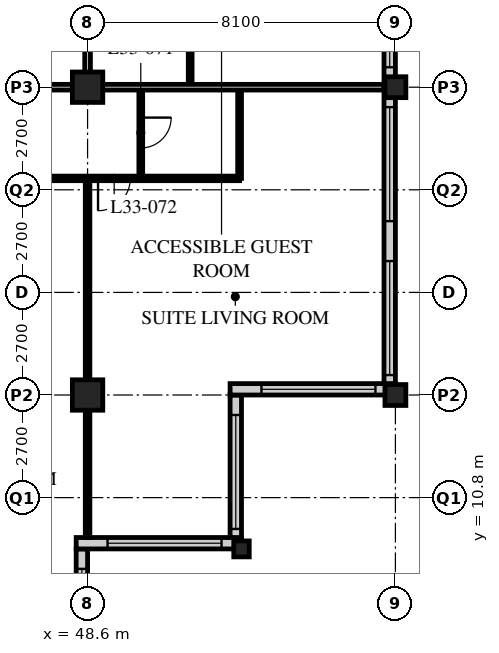
"""IFC4 building model, lengths in metres.
Left out: names, types, materials, properties, quantities, classifications, styles, units other than length and angle.
Written with IfcOpenShell. Run it as: python <this file> out.ifc"""

import sys

from ifc_helpers import new_model, si_unit, direction, frame, frame_2d, origin, origin_2d, place, context, subcontext, project, spatial, rectangle, hollow_rectangle, i_section, extrude, element, fill, save


model = new_model("IFC4")
c1 = context("Model", 3, precision=1e-05, world=origin(), true_north=direction((0.0, 1.0)))
c2 = subcontext(c1, "Body", "Model", "MODEL_VIEW")
j1 = project(units=[si_unit("LENGTHUNIT", "METRE"), si_unit("PLANEANGLEUNIT", "RADIAN")], contexts=[c1])
p1 = place(None, origin())
s1 = spatial("IfcSite", under=j1, at=p1, CompositionType="ELEMENT")
p2 = place(p1, origin())
s2 = spatial("IfcBuilding", under=s1, at=p2, CompositionType="ELEMENT")
p3 = place(p2, frame((0.0, 0.0, 130.6)))
s3 = spatial("IfcBuildingStorey", under=s2, at=p3, CompositionType="ELEMENT", Elevation=130.6)
for number, where, z_axis, x_axis in (
    (1, (48.6, 13.5, 0.0), (0.0, 0.0, 1.0), (1.0, 0.0, 0.0)),
    (2, (48.6, 21.6, 0.0), (0.0, 0.0, 1.0), (1.0, 0.0, 0.0)),
):
    element("IfcColumn", number, at=place(p3, frame(where, z_axis=z_axis, x_axis=x_axis)), inside=s3, PredefinedType="COLUMN", context=c2, shape_type="SweptSolid", body=[
        extrude(hollow_rectangle(XDim=0.8, YDim=0.8, WallThickness=0.08, at=origin_2d()), origin(), (0.0, 0.0, 1.0), 3.4),
    ])
p4 = place(p3, frame((52.65, 9.45, 0.0), z_axis=(0.0, 0.0, 1.0), x_axis=(1.0, 0.0, 0.0)))
e3 = element("IfcColumn", 3, at=p4, inside=s3, PredefinedType="COLUMN", context=c2, shape_type="SweptSolid", body=[
    extrude(i_section(OverallWidth=0.407, OverallDepth=0.419, WebThickness=0.031, FlangeThickness=0.049, FilletRadius=0.015, at=origin_2d()), origin(), (0.0, 0.0, 1.0), 3.4),
])
for number, where, z_axis, x_axis in (
    (4, (56.7, 13.5, 0.0), (0.0, 0.0, 1.0), (1.0, 0.0, 0.0)),
    (5, (56.7, 21.6, 0.0), (0.0, 0.0, 1.0), (1.0, 0.0, 0.0)),
):
    element("IfcColumn", number, at=place(p3, frame(where, z_axis=z_axis, x_axis=x_axis)), inside=s3, PredefinedType="COLUMN", context=c2, shape_type="SweptSolid", body=[
        extrude(hollow_rectangle(XDim=0.55, YDim=0.55, WallThickness=0.04, at=origin_2d()), origin(), (0.0, 0.0, 1.0), 3.4),
    ])
p5 = place(p3, frame((48.45, 5.7, 0.0), z_axis=(0.0, 0.0, 1.0), x_axis=(0.0, 1.0, 0.0)))
e6 = element("IfcWall", 6, at=p5, inside=s3, PredefinedType="SOLIDWALL", context=c2, shape_type="SweptSolid", body=[
    extrude(rectangle(XDim=3.75, YDim=0.3, at=frame_2d((1.875, 0.0))), origin(), (0.0, 0.0, 1.0), 3.19),
])
p6 = place(p5, frame((0.225, 0.0, 0.9)))
e7 = element("IfcOpeningElement", 7, at=p6, cuts=e6, PredefinedType="OPENING", context=c2, shape_type="SweptSolid", body=[
    extrude(rectangle(XDim=3.0, YDim=1.5, at=frame_2d((1.5, 0.75))), frame((0.0, 0.16, 0.0), z_axis=(0.0, -1.0, 0.0), x_axis=(1.0, 0.0, 0.0)), (0.0, 0.0, 1.0), 0.32),
])
p7 = place(p3, frame((48.3, 9.6, 0.0), z_axis=(0.0, 0.0, 1.0), x_axis=(1.0, 0.0, 0.0)))
e8 = element("IfcWall", 8, at=p7, inside=s3, PredefinedType="SOLIDWALL", context=c2, shape_type="SweptSolid", body=[
    extrude(rectangle(XDim=4.35, YDim=0.3, at=frame_2d((2.175, 0.0))), origin(), (0.0, 0.0, 1.0), 3.19),
])
p8 = place(p7, frame((0.825, 0.0, 0.9)))
e9 = element("IfcOpeningElement", 9, at=p8, cuts=e8, PredefinedType="OPENING", context=c2, shape_type="SweptSolid", body=[
    extrude(rectangle(XDim=3.0, YDim=1.5, at=frame_2d((1.5, 0.75))), frame((0.0, 0.16, 0.0), z_axis=(0.0, -1.0, 0.0), x_axis=(1.0, 0.0, 0.0)), (0.0, 0.0, 1.0), 0.32),
])
p9 = place(p3, frame((52.5, 9.75, 0.0), z_axis=(0.0, 0.0, 1.0), x_axis=(0.0, 1.0, 0.0)))
e10 = element("IfcWall", 10, at=p9, inside=s3, PredefinedType="SOLIDWALL", context=c2, shape_type="SweptSolid", body=[
    extrude(rectangle(XDim=3.75, YDim=0.3, at=frame_2d((1.875, 0.0))), origin(), (0.0, 0.0, 1.0), 3.19),
])
p10 = place(p9, frame((0.225, 0.0, 0.9)))
e11 = element("IfcOpeningElement", 11, at=p10, cuts=e10, PredefinedType="OPENING", context=c2, shape_type="SweptSolid", body=[
    extrude(rectangle(XDim=3.0, YDim=1.5, at=frame_2d((1.5, 0.75))), frame((0.0, 0.16, 0.0), z_axis=(0.0, -1.0, 0.0), x_axis=(1.0, 0.0, 0.0)), (0.0, 0.0, 1.0), 0.32),
])
p11 = place(p3, frame((52.35, 13.65, 0.0), z_axis=(0.0, 0.0, 1.0), x_axis=(1.0, 0.0, 0.0)))
e12 = element("IfcWall", 12, at=p11, inside=s3, PredefinedType="SOLIDWALL", context=c2, shape_type="SweptSolid", body=[
    extrude(rectangle(XDim=4.35, YDim=0.3, at=frame_2d((2.175, 0.0))), origin(), (0.0, 0.0, 1.0), 3.19),
])
p12 = place(p11, frame((0.825, 0.0, 0.9)))
e13 = element("IfcOpeningElement", 13, at=p12, cuts=e12, PredefinedType="OPENING", context=c2, shape_type="SweptSolid", body=[
    extrude(rectangle(XDim=3.0, YDim=1.5, at=frame_2d((1.5, 0.75))), frame((0.0, 0.16, 0.0), z_axis=(0.0, -1.0, 0.0), x_axis=(1.0, 0.0, 0.0)), (0.0, 0.0, 1.0), 0.32),
])
p13 = place(p3, frame((56.55, 13.8, 0.0), z_axis=(0.0, 0.0, 1.0), x_axis=(0.0, 1.0, 0.0)))
e14 = element("IfcWall", 14, at=p13, inside=s3, PredefinedType="SOLIDWALL", context=c2, shape_type="SweptSolid", body=[
    extrude(rectangle(XDim=32.1, YDim=0.3, at=frame_2d((16.05, 0.0))), origin(), (0.0, 0.0, 1.0), 3.19),
])
p14 = place(p13, frame((0.225, 0.0, 0.9)))
e15 = element("IfcOpeningElement", 15, at=p14, cuts=e14, PredefinedType="OPENING", context=c2, shape_type="SweptSolid", body=[
    extrude(rectangle(XDim=3.0, YDim=2.0, at=frame_2d((1.5, 1.0))), frame((0.0, 0.16, 0.0), z_axis=(0.0, -1.0, 0.0), x_axis=(1.0, 0.0, 0.0)), (0.0, 0.0, 1.0), 0.32),
])
p15 = place(p13, frame((4.275, 0.0, 0.9)))
e16 = element("IfcOpeningElement", 16, at=p15, cuts=e14, PredefinedType="OPENING", context=c2, shape_type="SweptSolid", body=[
    extrude(rectangle(XDim=3.0, YDim=2.0, at=frame_2d((1.5, 1.0))), frame((0.0, 0.16, 0.0), z_axis=(0.0, -1.0, 0.0), x_axis=(1.0, 0.0, 0.0)), (0.0, 0.0, 1.0), 0.32),
])
p16 = place(p13, frame((8.325, 0.0, 0.9)))
e17 = element("IfcOpeningElement", 17, at=p16, cuts=e14, PredefinedType="OPENING", context=c2, shape_type="SweptSolid", body=[
    extrude(rectangle(XDim=3.0, YDim=2.0, at=frame_2d((1.5, 1.0))), frame((0.0, 0.16, 0.0), z_axis=(0.0, -1.0, 0.0), x_axis=(1.0, 0.0, 0.0)), (0.0, 0.0, 1.0), 0.32),
])
p17 = place(p13, frame((12.375, 0.0, 0.9)))
e18 = element("IfcOpeningElement", 18, at=p17, cuts=e14, PredefinedType="OPENING", context=c2, shape_type="SweptSolid", body=[
    extrude(rectangle(XDim=3.0, YDim=2.0, at=frame_2d((1.5, 1.0))), frame((0.0, 0.16, 0.0), z_axis=(0.0, -1.0, 0.0), x_axis=(1.0, 0.0, 0.0)), (0.0, 0.0, 1.0), 0.32),
])
p18 = place(p13, frame((16.425, 0.0, 0.9)))
e19 = element("IfcOpeningElement", 19, at=p18, cuts=e14, PredefinedType="OPENING", context=c2, shape_type="SweptSolid", body=[
    extrude(rectangle(XDim=3.0, YDim=2.0, at=frame_2d((1.5, 1.0))), frame((0.0, 0.16, 0.0), z_axis=(0.0, -1.0, 0.0), x_axis=(1.0, 0.0, 0.0)), (0.0, 0.0, 1.0), 0.32),
])
p19 = place(p13, frame((20.475, 0.0, 0.9)))
e20 = element("IfcOpeningElement", 20, at=p19, cuts=e14, PredefinedType="OPENING", context=c2, shape_type="SweptSolid", body=[
    extrude(rectangle(XDim=3.0, YDim=2.0, at=frame_2d((1.5, 1.0))), frame((0.0, 0.16, 0.0), z_axis=(0.0, -1.0, 0.0), x_axis=(1.0, 0.0, 0.0)), (0.0, 0.0, 1.0), 0.32),
])
p20 = place(p13, frame((24.525, 0.0, 0.9)))
e21 = element("IfcOpeningElement", 21, at=p20, cuts=e14, PredefinedType="OPENING", context=c2, shape_type="SweptSolid", body=[
    extrude(rectangle(XDim=3.0, YDim=2.0, at=frame_2d((1.5, 1.0))), frame((0.0, 0.16, 0.0), z_axis=(0.0, -1.0, 0.0), x_axis=(1.0, 0.0, 0.0)), (0.0, 0.0, 1.0), 0.32),
])
p21 = place(p13, frame((28.575, 0.0, 0.9)))
e22 = element("IfcOpeningElement", 22, at=p21, cuts=e14, PredefinedType="OPENING", context=c2, shape_type="SweptSolid", body=[
    extrude(rectangle(XDim=3.0, YDim=2.0, at=frame_2d((1.5, 1.0))), frame((0.0, 0.16, 0.0), z_axis=(0.0, -1.0, 0.0), x_axis=(1.0, 0.0, 0.0)), (0.0, 0.0, 1.0), 0.32),
])
p22 = place(p3, frame((8.1, 21.6, 0.0), z_axis=(0.0, 0.0, 1.0), x_axis=(1.0, 0.0, 0.0)))
e23 = element("IfcWall", 23, at=p22, inside=s3, PredefinedType="PARTITIONING", context=c2, shape_type="SweptSolid", body=[
    extrude(rectangle(XDim=40.5, YDim=0.15, at=frame_2d((20.25, 0.0))), origin(), (0.0, 0.0, 1.0), 2.578),
])
p23 = place(p22, frame((9.625, 0.0, 0.0)))
e24 = element("IfcOpeningElement", 24, at=p23, cuts=e23, PredefinedType="OPENING", context=c2, shape_type="SweptSolid", body=[
    extrude(rectangle(XDim=1.0, YDim=2.1, at=frame_2d((0.5, 1.05))), frame((0.0, 0.085, 0.0), z_axis=(0.0, -1.0, 0.0), x_axis=(1.0, 0.0, 0.0)), (0.0, 0.0, 1.0), 0.17),
])
p24 = place(p22, frame((21.775, 0.0, 0.0)))
e25 = element("IfcOpeningElement", 25, at=p24, cuts=e23, PredefinedType="OPENING", context=c2, shape_type="SweptSolid", body=[
    extrude(rectangle(XDim=1.0, YDim=2.1, at=frame_2d((0.5, 1.05))), frame((0.0, 0.085, 0.0), z_axis=(0.0, -1.0, 0.0), x_axis=(1.0, 0.0, 0.0)), (0.0, 0.0, 1.0), 0.17),
])
p25 = place(p22, frame((28.95, 0.0, 0.0)))
e26 = element("IfcOpeningElement", 26, at=p25, cuts=e23, PredefinedType="OPENING", context=c2, shape_type="SweptSolid", body=[
    extrude(rectangle(XDim=1.0, YDim=2.1, at=frame_2d((0.5, 1.05))), frame((0.0, 0.085, 0.0), z_axis=(0.0, -1.0, 0.0), x_axis=(1.0, 0.0, 0.0)), (0.0, 0.0, 1.0), 0.17),
])
p26 = place(p22, frame((34.85, 0.0, 0.0)))
e27 = element("IfcOpeningElement", 27, at=p26, cuts=e23, PredefinedType="OPENING", context=c2, shape_type="SweptSolid", body=[
    extrude(rectangle(XDim=1.0, YDim=2.1, at=frame_2d((0.5, 1.05))), frame((0.0, 0.085, 0.0), z_axis=(0.0, -1.0, 0.0), x_axis=(1.0, 0.0, 0.0)), (0.0, 0.0, 1.0), 0.17),
])
p27 = place(p22, frame((1.525, 0.0, 0.0)))
e28 = element("IfcOpeningElement", 28, at=p27, cuts=e23, PredefinedType="OPENING", context=c2, shape_type="SweptSolid", body=[
    extrude(rectangle(XDim=1.0, YDim=2.1, at=frame_2d((0.5, 1.05))), frame((0.0, 0.085, 0.0), z_axis=(0.0, -1.0, 0.0), x_axis=(1.0, 0.0, 0.0)), (0.0, 0.0, 1.0), 0.17),
])
p28 = place(p22, frame((37.975, 0.0, 0.0)))
e29 = element("IfcOpeningElement", 29, at=p28, cuts=e23, PredefinedType="OPENING", context=c2, shape_type="SweptSolid", body=[
    extrude(rectangle(XDim=1.0, YDim=2.1, at=frame_2d((0.5, 1.05))), frame((0.0, 0.085, 0.0), z_axis=(0.0, -1.0, 0.0), x_axis=(1.0, 0.0, 0.0)), (0.0, 0.0, 1.0), 0.17),
])
p29 = place(p3, frame((48.6, 21.6, 0.0), z_axis=(0.0, 0.0, 1.0), x_axis=(0.0, 1.0, 0.0)))
e30 = element("IfcWall", 30, at=p29, inside=s3, PredefinedType="PARTITIONING", context=c2, shape_type="SweptSolid", body=[
    extrude(rectangle(XDim=24.3, YDim=0.15, at=frame_2d((12.15, 0.0))), origin(), (0.0, 0.0, 1.0), 2.578),
])
p30 = place(p29, frame((2.75, 0.0, 0.0)))
e31 = element("IfcOpeningElement", 31, at=p30, cuts=e30, PredefinedType="OPENING", context=c2, shape_type="SweptSolid", body=[
    extrude(rectangle(XDim=1.0, YDim=2.1, at=frame_2d((0.5, 1.05))), frame((0.0, 0.085, 0.0), z_axis=(0.0, -1.0, 0.0), x_axis=(1.0, 0.0, 0.0)), (0.0, 0.0, 1.0), 0.17),
])
p31 = place(p29, frame((4.65, 0.0, 0.0)))
e32 = element("IfcOpeningElement", 32, at=p31, cuts=e30, PredefinedType="OPENING", context=c2, shape_type="SweptSolid", body=[
    extrude(rectangle(XDim=1.0, YDim=2.1, at=frame_2d((0.5, 1.05))), frame((0.0, 0.085, 0.0), z_axis=(0.0, -1.0, 0.0), x_axis=(1.0, 0.0, 0.0)), (0.0, 0.0, 1.0), 0.17),
])
p32 = place(p29, frame((10.0, 0.0, 0.0)))
e33 = element("IfcOpeningElement", 33, at=p32, cuts=e30, PredefinedType="OPENING", context=c2, shape_type="SweptSolid", body=[
    extrude(rectangle(XDim=1.0, YDim=2.1, at=frame_2d((0.5, 1.05))), frame((0.0, 0.085, 0.0), z_axis=(0.0, -1.0, 0.0), x_axis=(1.0, 0.0, 0.0)), (0.0, 0.0, 1.0), 0.17),
])
p33 = place(p29, frame((18.1, 0.0, 0.0)))
e34 = element("IfcOpeningElement", 34, at=p33, cuts=e30, PredefinedType="OPENING", context=c2, shape_type="SweptSolid", body=[
    extrude(rectangle(XDim=1.0, YDim=2.1, at=frame_2d((0.5, 1.05))), frame((0.0, 0.085, 0.0), z_axis=(0.0, -1.0, 0.0), x_axis=(1.0, 0.0, 0.0)), (0.0, 0.0, 1.0), 0.17),
])
p34 = place(p3, frame((51.3, 21.6, 0.0), z_axis=(0.0, 0.0, 1.0), x_axis=(0.0, 1.0, 0.0)))
e35 = element("IfcWall", 35, at=p34, inside=s3, PredefinedType="PARTITIONING", context=c2, shape_type="SweptSolid", body=[
    extrude(rectangle(XDim=2.6, YDim=0.1, at=frame_2d((1.3, 0.0))), origin(), (0.0, 0.0, 1.0), 3.19),
])
p35 = place(p3, frame((44.55, 19.2, 0.0), z_axis=(0.0, 0.0, 1.0), x_axis=(1.0, 0.0, 0.0)))
e36 = element("IfcWall", 36, at=p35, inside=s3, PredefinedType="PARTITIONING", context=c2, shape_type="SweptSolid", body=[
    extrude(rectangle(XDim=8.05, YDim=0.12, at=frame_2d((4.025, 0.0))), origin(), (0.0, 0.0, 1.0), 3.19),
])
p36 = place(p35, frame((0.475, 0.0, 0.0)))
e37 = element("IfcOpeningElement", 37, at=p36, cuts=e36, PredefinedType="OPENING", context=c2, shape_type="SweptSolid", body=[
    extrude(rectangle(XDim=0.85, YDim=2.1, at=frame_2d((0.425, 1.05))), frame((0.0, 0.07, 0.0), z_axis=(0.0, -1.0, 0.0), x_axis=(1.0, 0.0, 0.0)), (0.0, 0.0, 1.0), 0.14),
])
p37 = place(p35, frame((4.325, 0.0, 0.0)))
e38 = element("IfcOpeningElement", 38, at=p37, cuts=e36, PredefinedType="OPENING", context=c2, shape_type="SweptSolid", body=[
    extrude(rectangle(XDim=0.85, YDim=2.1, at=frame_2d((0.425, 1.05))), frame((0.0, 0.07, 0.0), z_axis=(0.0, -1.0, 0.0), x_axis=(1.0, 0.0, 0.0)), (0.0, 0.0, 1.0), 0.14),
])
p38 = place(p3, frame((50.0, 21.6, 0.0), z_axis=(0.0, 0.0, 1.0), x_axis=(0.0, -1.0, 0.0)))
e39 = element("IfcWall", 39, at=p38, inside=s3, PredefinedType="PARTITIONING", context=c2, shape_type="SweptSolid", body=[
    extrude(rectangle(XDim=2.4, YDim=0.1, at=frame_2d((1.2, 0.0))), origin(), (0.0, 0.0, 1.0), 3.19),
])
p39 = place(p38, frame((0.8, 0.0, 0.0)))
e40 = element("IfcOpeningElement", 40, at=p39, cuts=e39, PredefinedType="OPENING", context=c2, shape_type="SweptSolid", body=[
    extrude(rectangle(XDim=0.8, YDim=2.1, at=frame_2d((0.4, 1.05))), frame((0.0, 0.06, 0.0), z_axis=(0.0, -1.0, 0.0), x_axis=(1.0, 0.0, 0.0)), (0.0, 0.0, 1.0), 0.12),
])
p40 = place(p3, frame((52.6, 21.6, 0.0), z_axis=(0.0, 0.0, 1.0), x_axis=(0.0, -1.0, 0.0)))
e41 = element("IfcWall", 41, at=p40, inside=s3, PredefinedType="PARTITIONING", context=c2, shape_type="SweptSolid", body=[
    extrude(rectangle(XDim=2.4, YDim=0.1, at=frame_2d((1.2, 0.0))), origin(), (0.0, 0.0, 1.0), 3.19),
])
p41 = place(p3, frame((48.6, 19.2, 0.0), z_axis=(0.0, 0.0, 1.0), x_axis=(0.0, -1.0, 0.0)))
e42 = element("IfcWall", 42, at=p41, inside=s3, PredefinedType="PARTITIONING", context=c2, shape_type="SweptSolid", body=[
    extrude(rectangle(XDim=9.45, YDim=0.12, at=frame_2d((4.725, 0.0))), origin(), (0.0, 0.0, 1.0), 2.578),
])
p42 = place(p3, frame((48.6, 21.6, 0.0), z_axis=(0.0, 0.0, 1.0), x_axis=(1.0, 0.0, 0.0)))
e43 = element("IfcWall", 43, at=p42, inside=s3, PredefinedType="PARTITIONING", context=c2, shape_type="SweptSolid", body=[
    extrude(rectangle(XDim=7.8, YDim=0.15, at=frame_2d((3.9, 0.0))), origin(), (0.0, 0.0, 1.0), 2.578),
])
p43 = place(p6, origin())
e44 = element("IfcWindow", 44, at=p43, inside=s3, PartitioningType="SINGLE_PANEL", PredefinedType="WINDOW", context=c2, shape_type="SweptSolid", body=[
    extrude(rectangle(XDim=3.0, YDim=1.5, at=frame_2d((1.5, 0.75))), frame((0.0, 0.03, 0.0), z_axis=(0.0, -1.0, 0.0), x_axis=(1.0, 0.0, 0.0)), (0.0, 0.0, 1.0), 0.06),
])
fill(e7, e44)
p44 = place(p8, origin())
e45 = element("IfcWindow", 45, at=p44, inside=s3, PartitioningType="SINGLE_PANEL", PredefinedType="WINDOW", context=c2, shape_type="SweptSolid", body=[
    extrude(rectangle(XDim=3.0, YDim=1.5, at=frame_2d((1.5, 0.75))), frame((0.0, 0.03, 0.0), z_axis=(0.0, -1.0, 0.0), x_axis=(1.0, 0.0, 0.0)), (0.0, 0.0, 1.0), 0.06),
])
fill(e9, e45)
p45 = place(p10, origin())
e46 = element("IfcWindow", 46, at=p45, inside=s3, PartitioningType="SINGLE_PANEL", PredefinedType="WINDOW", context=c2, shape_type="SweptSolid", body=[
    extrude(rectangle(XDim=3.0, YDim=1.5, at=frame_2d((1.5, 0.75))), frame((0.0, 0.03, 0.0), z_axis=(0.0, -1.0, 0.0), x_axis=(1.0, 0.0, 0.0)), (0.0, 0.0, 1.0), 0.06),
])
fill(e11, e46)
p46 = place(p12, origin())
e47 = element("IfcWindow", 47, at=p46, inside=s3, PartitioningType="SINGLE_PANEL", PredefinedType="WINDOW", context=c2, shape_type="SweptSolid", body=[
    extrude(rectangle(XDim=3.0, YDim=1.5, at=frame_2d((1.5, 0.75))), frame((0.0, 0.03, 0.0), z_axis=(0.0, -1.0, 0.0), x_axis=(1.0, 0.0, 0.0)), (0.0, 0.0, 1.0), 0.06),
])
fill(e13, e47)
p47 = place(p14, origin())
e48 = element("IfcWindow", 48, at=p47, inside=s3, PartitioningType="SINGLE_PANEL", PredefinedType="WINDOW", context=c2, shape_type="SweptSolid", body=[
    extrude(rectangle(XDim=3.0, YDim=2.0, at=frame_2d((1.5, 1.0))), frame((0.0, 0.03, 0.0), z_axis=(0.0, -1.0, 0.0), x_axis=(1.0, 0.0, 0.0)), (0.0, 0.0, 1.0), 0.06),
])
fill(e15, e48)
p48 = place(p15, origin())
e49 = element("IfcWindow", 49, at=p48, inside=s3, PartitioningType="SINGLE_PANEL", PredefinedType="WINDOW", context=c2, shape_type="SweptSolid", body=[
    extrude(rectangle(XDim=3.0, YDim=2.0, at=frame_2d((1.5, 1.0))), frame((0.0, 0.03, 0.0), z_axis=(0.0, -1.0, 0.0), x_axis=(1.0, 0.0, 0.0)), (0.0, 0.0, 1.0), 0.06),
])
fill(e16, e49)
p49 = place(p16, origin())
e50 = element("IfcWindow", 50, at=p49, inside=s3, PartitioningType="SINGLE_PANEL", PredefinedType="WINDOW", context=c2, shape_type="SweptSolid", body=[
    extrude(rectangle(XDim=3.0, YDim=2.0, at=frame_2d((1.5, 1.0))), frame((0.0, 0.03, 0.0), z_axis=(0.0, -1.0, 0.0), x_axis=(1.0, 0.0, 0.0)), (0.0, 0.0, 1.0), 0.06),
])
fill(e17, e50)
p50 = place(p39, origin())
e51 = element("IfcDoor", 51, at=p50, inside=s3, OperationType="SINGLE_SWING_LEFT", PredefinedType="DOOR", context=c2, shape_type="SweptSolid", body=[
    extrude(rectangle(XDim=0.8, YDim=2.1, at=frame_2d((0.4, 1.05))), frame((0.0, 0.025, 0.0), z_axis=(0.0, -1.0, 0.0), x_axis=(1.0, 0.0, 0.0)), (0.0, 0.0, 1.0), 0.05),
])
fill(e40, e51)
p51 = place(p37, origin())
e52 = element("IfcDoor", 52, at=p51, inside=s3, OperationType="SINGLE_SWING_RIGHT", PredefinedType="DOOR", context=c2, shape_type="SweptSolid", body=[
    extrude(rectangle(XDim=0.85, YDim=2.1, at=frame_2d((0.425, 1.05))), frame((0.0, 0.025, 0.0), z_axis=(0.0, -1.0, 0.0), x_axis=(1.0, 0.0, 0.0)), (0.0, 0.0, 1.0), 0.05),
])
fill(e38, e52)
save(model, sys.argv[1])
